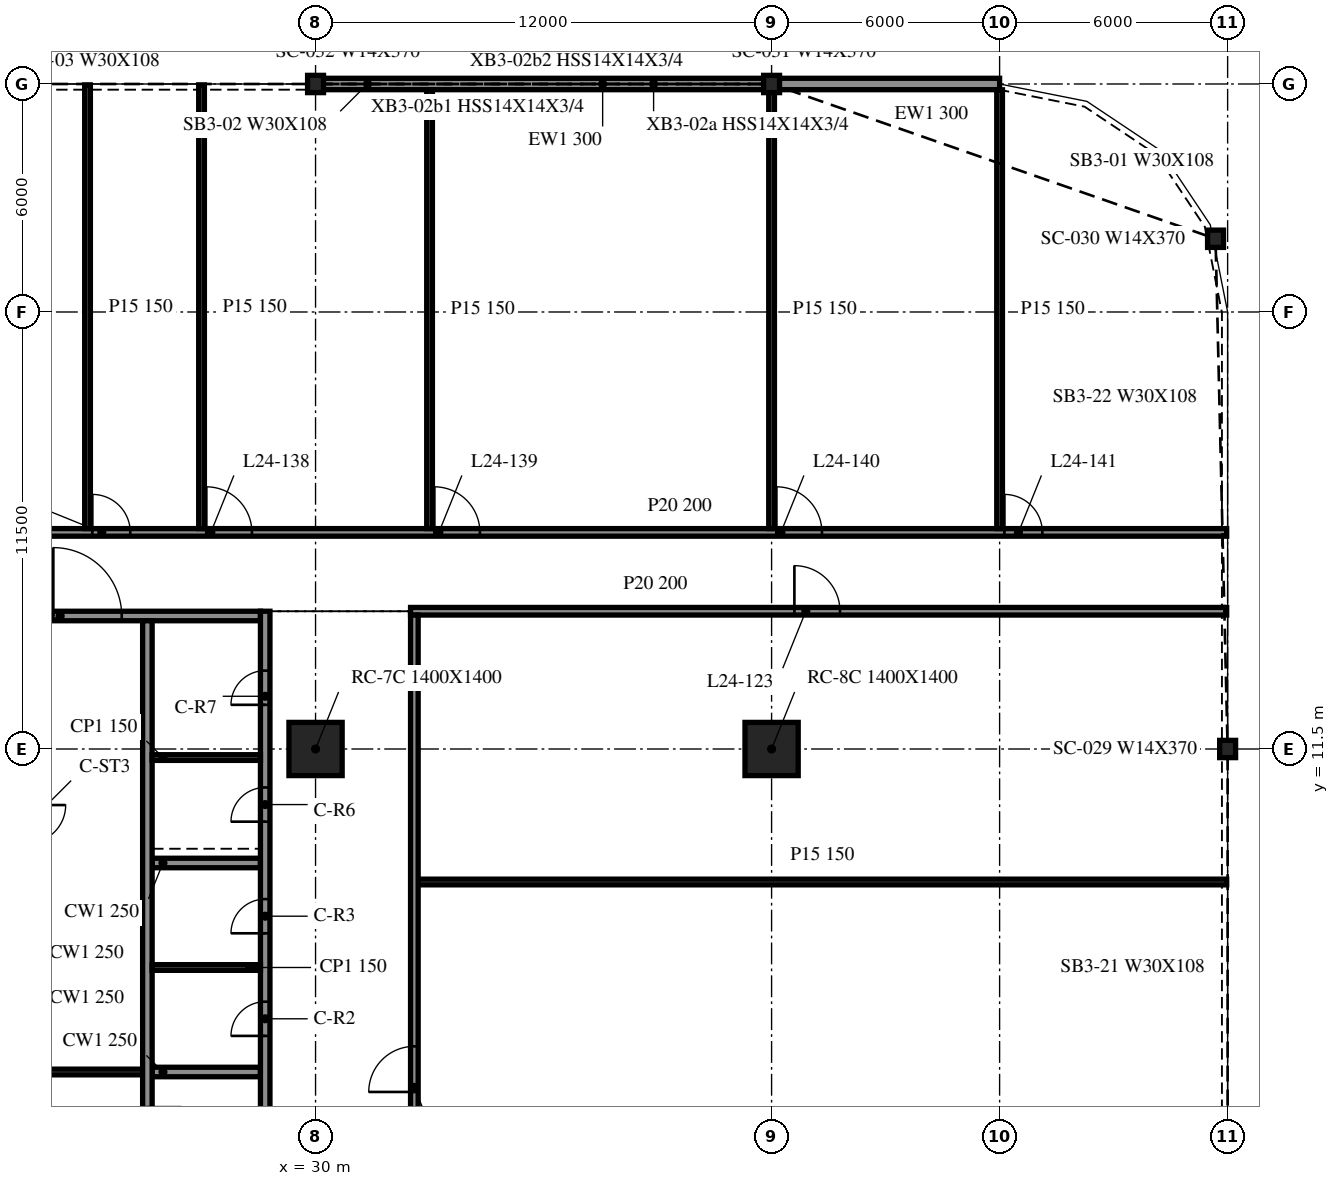
"""IFC4 building model, lengths in metres.
Left out: names, types, materials, properties, quantities, classifications, styles, units other than length and angle.
Written with IfcOpenShell. Run it as: python <this file> out.ifc"""

import sys

from ifc_helpers import new_model, si_unit, direction, frame, frame_2d, origin, origin_2d, place, context, subcontext, project, spatial, rectangle, i_section, extrude, element, fill, save


model = new_model("IFC4")
c1 = context("Model", 3, precision=1e-05, world=origin(), true_north=direction((0.0, 1.0)))
c2 = subcontext(c1, "Body", "Model", "MODEL_VIEW")
j1 = project(units=[si_unit("LENGTHUNIT", "METRE"), si_unit("PLANEANGLEUNIT", "RADIAN")], contexts=[c1])
p1 = place(None, origin())
s1 = spatial("IfcSite", under=j1, at=p1, CompositionType="ELEMENT")
p2 = place(p1, origin())
s2 = spatial("IfcBuilding", under=s1, at=p2, CompositionType="ELEMENT")
p3 = place(p2, frame((0.0, 0.0, 105.3)))
s3 = spatial("IfcBuildingStorey", under=s2, at=p3, CompositionType="ELEMENT", Elevation=105.3)
for number, where, z_axis, x_axis in (
    (1, (30.0, 11.5, -0.34), (0.0, 0.0, 1.0), (1.0, 0.0, 0.0)),
    (2, (42.0, 11.5, -0.34), (0.0, 0.0, 1.0), (1.0, 0.0, 0.0)),
):
    element("IfcColumn", number, at=place(p3, frame(where, z_axis=z_axis, x_axis=x_axis)), inside=s3, PredefinedType="COLUMN", context=c2, shape_type="SweptSolid", body=[
        extrude(rectangle(XDim=1.4, YDim=1.4, at=origin_2d()), origin(), (0.0, 0.0, 1.0), 4.1),
    ])
for number, where, z_axis, x_axis in (
    (3, (53.682, 24.927, -0.34), (0.0, 0.0, 1.0), (1.0, 0.0, 0.0)),
    (4, (42.0, 29.0, -0.34), (0.0, 0.0, 1.0), (1.0, 0.0, 0.0)),
    (5, (30.0, 29.0, -0.34), (0.0, 0.0, 1.0), (1.0, 0.0, 0.0)),
    (6, (54.0, 11.5, -0.34), (0.0, 0.0, 1.0), (1.0, 0.0, 0.0)),
):
    element("IfcColumn", number, at=place(p3, frame(where, z_axis=z_axis, x_axis=x_axis)), inside=s3, PredefinedType="COLUMN", context=c2, shape_type="SweptSolid", body=[
        extrude(i_section(OverallWidth=0.419, OverallDepth=0.455, WebThickness=0.042, FlangeThickness=0.068, at=origin_2d()), origin(), (0.0, 0.0, 1.0), 4.1),
    ])
p4 = place(p3, frame((48.0, 29.0, 0.0), z_axis=(0.0, 0.0, 1.0), x_axis=(-1.0, 0.0, 0.0)))
e7 = element("IfcWall", 7, at=p4, inside=s3, PredefinedType="NOTDEFINED", context=c2, shape_type="SweptSolid", body=[
    extrude(rectangle(XDim=5.979, YDim=0.3, at=frame_2d((2.99, 0.0))), origin(), (0.0, 0.0, 1.0), 3.003),
])
p5 = place(p3, frame((41.979, 29.0, 0.0), z_axis=(0.0, 0.0, 1.0), x_axis=(-1.0, 0.0, 0.0)))
e8 = element("IfcWall", 8, at=p5, inside=s3, PredefinedType="NOTDEFINED", context=c2, shape_type="SweptSolid", body=[
    extrude(rectangle(XDim=11.958, YDim=0.3, at=frame_2d((5.979, 0.0))), origin(), (0.0, 0.0, 1.0), 3.003),
])
p6 = place(p3, frame((28.675, -9.125, 0.0), z_axis=(0.0, 0.0, 1.0), x_axis=(0.0, 1.0, 0.0)))
e9 = element("IfcWall", 9, at=p6, inside=s3, PredefinedType="SOLIDWALL", context=c2, shape_type="SweptSolid", body=[
    extrude(rectangle(XDim=24.25, YDim=0.25, at=frame_2d((12.125, 0.0))), origin(), (0.0, 0.0, 1.0), 3.76),
])
p7 = place(p6, frame((13.075, 0.0, 0.0)))
e10 = element("IfcOpeningElement", 10, at=p7, cuts=e9, PredefinedType="OPENING", context=c2, shape_type="SweptSolid", body=[
    extrude(rectangle(XDim=0.9, YDim=2.1, at=frame_2d((0.45, 1.05))), frame((0.0, 0.135, 0.0), z_axis=(0.0, -1.0, 0.0), x_axis=(1.0, 0.0, 0.0)), (0.0, 0.0, 1.0), 0.27),
])
p8 = place(p6, frame((15.775, 0.0, 0.0)))
e11 = element("IfcOpeningElement", 11, at=p8, cuts=e9, PredefinedType="OPENING", context=c2, shape_type="SweptSolid", body=[
    extrude(rectangle(XDim=0.9, YDim=2.1, at=frame_2d((0.45, 1.05))), frame((0.0, 0.135, 0.0), z_axis=(0.0, -1.0, 0.0), x_axis=(1.0, 0.0, 0.0)), (0.0, 0.0, 1.0), 0.27),
])
p9 = place(p6, frame((18.712, 0.0, 0.0)))
e12 = element("IfcOpeningElement", 12, at=p9, cuts=e9, PredefinedType="OPENING", context=c2, shape_type="SweptSolid", body=[
    extrude(rectangle(XDim=0.9, YDim=2.1, at=frame_2d((0.45, 1.05))), frame((0.0, 0.135, 0.0), z_axis=(0.0, -1.0, 0.0), x_axis=(1.0, 0.0, 0.0)), (0.0, 0.0, 1.0), 0.27),
])
p10 = place(p6, frame((21.788, 0.0, 0.0)))
e13 = element("IfcOpeningElement", 13, at=p10, cuts=e9, PredefinedType="OPENING", context=c2, shape_type="SweptSolid", body=[
    extrude(rectangle(XDim=0.9, YDim=2.1, at=frame_2d((0.45, 1.05))), frame((0.0, 0.135, 0.0), z_axis=(0.0, -1.0, 0.0), x_axis=(1.0, 0.0, 0.0)), (0.0, 0.0, 1.0), 0.27),
])
p11 = place(p3, frame((19.45, 15.0, 0.0), z_axis=(0.0, 0.0, 1.0), x_axis=(1.0, 0.0, 0.0)))
e14 = element("IfcWall", 14, at=p11, inside=s3, PredefinedType="SOLIDWALL", context=c2, shape_type="SweptSolid", body=[
    extrude(rectangle(XDim=9.1, YDim=0.25, at=frame_2d((4.55, 0.0))), origin(), (0.0, 0.0, 1.0), 3.76),
])
p12 = place(p11, frame((3.65, 0.0, 0.0)))
e15 = element("IfcOpeningElement", 15, at=p12, cuts=e14, PredefinedType="OPENING", context=c2, shape_type="SweptSolid", body=[
    extrude(rectangle(XDim=1.8, YDim=2.1, at=frame_2d((0.9, 1.05))), frame((0.0, 0.135, 0.0), z_axis=(0.0, -1.0, 0.0), x_axis=(1.0, 0.0, 0.0)), (0.0, 0.0, 1.0), 0.27),
])
p13 = place(p3, frame((25.575, 14.875, 0.0), z_axis=(0.0, 0.0, 1.0), x_axis=(0.0, -1.0, 0.0)))
e16 = element("IfcWall", 16, at=p13, inside=s3, PredefinedType="SOLIDWALL", context=c2, shape_type="SweptSolid", body=[
    extrude(rectangle(XDim=17.5, YDim=0.25, at=frame_2d((8.75, 0.0))), origin(), (0.0, 0.0, 1.0), 3.76),
])
p14 = place(p13, frame((15.45, 0.0, 0.0)))
e17 = element("IfcOpeningElement", 17, at=p14, cuts=e16, PredefinedType="OPENING", context=c2, shape_type="SweptSolid", body=[
    extrude(rectangle(XDim=1.1, YDim=2.1, at=frame_2d((0.55, 1.05))), frame((0.0, 0.135, 0.0), z_axis=(0.0, -1.0, 0.0), x_axis=(1.0, 0.0, 0.0)), (0.0, 0.0, 1.0), 0.27),
])
p15 = place(p13, frame((12.8, 0.0, 0.0)))
e18 = element("IfcOpeningElement", 18, at=p15, cuts=e16, PredefinedType="OPENING", context=c2, shape_type="SweptSolid", body=[
    extrude(rectangle(XDim=0.9, YDim=2.1, at=frame_2d((0.45, 1.05))), frame((0.0, 0.135, 0.0), z_axis=(0.0, -1.0, 0.0), x_axis=(1.0, 0.0, 0.0)), (0.0, 0.0, 1.0), 0.27),
])
for number, where, z_axis, x_axis in (
    (19, (25.7, 3.0, 0.0), (0.0, 0.0, 1.0), (1.0, 0.0, 0.0)),
    (20, (25.7, 8.5, 0.0), (0.0, 0.0, 1.0), (1.0, 0.0, 0.0)),
):
    element("IfcWall", number, at=place(p3, frame(where, z_axis=z_axis, x_axis=x_axis)), inside=s3, PredefinedType="SOLIDWALL", context=c2, shape_type="SweptSolid", body=[
        extrude(rectangle(XDim=2.85, YDim=0.25, at=frame_2d((1.425, 0.0))), origin(), (0.0, 0.0, 1.0), 3.76),
    ])
p16 = place(p3, frame((22.55, 3.0, 0.0), z_axis=(0.0, 0.0, 1.0), x_axis=(1.0, 0.0, 0.0)))
e21 = element("IfcWall", 21, at=p16, inside=s3, PredefinedType="PARTITIONING", context=c2, shape_type="SweptSolid", body=[
    extrude(rectangle(XDim=2.9, YDim=0.15, at=frame_2d((1.45, 0.0))), origin(), (0.0, 0.0, 1.0), 3.76),
])
for number, where, z_axis, x_axis in (
    (22, (25.7, 5.75, 0.0), (0.0, 0.0, 1.0), (1.0, 0.0, 0.0)),
    (23, (25.7, 11.275, 0.0), (0.0, 0.0, 1.0), (1.0, 0.0, 0.0)),
):
    element("IfcWall", number, at=place(p3, frame(where, z_axis=z_axis, x_axis=x_axis)), inside=s3, PredefinedType="PARTITIONING", context=c2, shape_type="SweptSolid", body=[
        extrude(rectangle(XDim=2.85, YDim=0.15, at=frame_2d((1.425, 0.0))), origin(), (0.0, 0.0, 1.0), 3.76),
    ])
p17 = place(p3, frame((32.7, 8.0, 0.0), z_axis=(0.0, 0.0, 1.0), x_axis=(1.0, 0.0, 0.0)))
e24 = element("IfcWall", 24, at=p17, inside=s3, PredefinedType="PARTITIONING", context=c2, shape_type="SweptSolid", body=[
    extrude(rectangle(XDim=21.275, YDim=0.15, at=frame_2d((10.638, 0.0))), origin(), (0.0, 0.0, 1.0), 3.76),
])
p18 = place(p3, frame((32.5, 15.125, 0.0), z_axis=(0.0, 0.0, 1.0), x_axis=(1.0, 0.0, 0.0)))
e25 = element("IfcWall", 25, at=p18, inside=s3, PredefinedType="PARTITIONING", context=c2, shape_type="SweptSolid", body=[
    extrude(rectangle(XDim=21.475, YDim=0.2, at=frame_2d((10.738, 0.0))), origin(), (0.0, 0.0, 1.0), 3.76),
])
p19 = place(p18, frame((10.1, 0.0, 0.0)))
e26 = element("IfcOpeningElement", 26, at=p19, cuts=e25, PredefinedType="OPENING", context=c2, shape_type="SweptSolid", body=[
    extrude(rectangle(XDim=1.2, YDim=2.1, at=frame_2d((0.6, 1.05))), frame((0.0, 0.11, 0.0), z_axis=(0.0, -1.0, 0.0), x_axis=(1.0, 0.0, 0.0)), (0.0, 0.0, 1.0), 0.22),
])
p20 = place(p3, frame((-41.975, 17.2, 0.0), z_axis=(0.0, 0.0, 1.0), x_axis=(1.0, 0.0, 0.0)))
e27 = element("IfcWall", 27, at=p20, inside=s3, PredefinedType="PARTITIONING", context=c2, shape_type="SweptSolid", body=[
    extrude(rectangle(XDim=95.95, YDim=0.2, at=frame_2d((47.975, 0.0))), origin(), (0.0, 0.0, 1.0), 3.76),
])
p21 = place(p20, frame((4.3, 0.0, 0.0)))
e28 = element("IfcOpeningElement", 28, at=p21, cuts=e27, PredefinedType="OPENING", context=c2, shape_type="SweptSolid", body=[
    extrude(rectangle(XDim=1.2, YDim=2.1, at=frame_2d((0.6, 1.05))), frame((0.0, 0.11, 0.0), z_axis=(0.0, -1.0, 0.0), x_axis=(1.0, 0.0, 0.0)), (0.0, 0.0, 1.0), 0.22),
])
p22 = place(p20, frame((7.3, 0.0, 0.0)))
e29 = element("IfcOpeningElement", 29, at=p22, cuts=e27, PredefinedType="OPENING", context=c2, shape_type="SweptSolid", body=[
    extrude(rectangle(XDim=1.2, YDim=2.1, at=frame_2d((0.6, 1.05))), frame((0.0, 0.11, 0.0), z_axis=(0.0, -1.0, 0.0), x_axis=(1.0, 0.0, 0.0)), (0.0, 0.0, 1.0), 0.22),
])
p23 = place(p20, frame((13.3, 0.0, 0.0)))
e30 = element("IfcOpeningElement", 30, at=p23, cuts=e27, PredefinedType="OPENING", context=c2, shape_type="SweptSolid", body=[
    extrude(rectangle(XDim=1.2, YDim=2.1, at=frame_2d((0.6, 1.05))), frame((0.0, 0.11, 0.0), z_axis=(0.0, -1.0, 0.0), x_axis=(1.0, 0.0, 0.0)), (0.0, 0.0, 1.0), 0.22),
])
p24 = place(p20, frame((22.5, 0.0, 0.0)))
e31 = element("IfcOpeningElement", 31, at=p24, cuts=e27, PredefinedType="OPENING", context=c2, shape_type="SweptSolid", body=[
    extrude(rectangle(XDim=1.0, YDim=2.1, at=frame_2d((0.5, 1.05))), frame((0.0, 0.11, 0.0), z_axis=(0.0, -1.0, 0.0), x_axis=(1.0, 0.0, 0.0)), (0.0, 0.0, 1.0), 0.22),
])
p25 = place(p20, frame((28.5, 0.0, 0.0)))
e32 = element("IfcOpeningElement", 32, at=p25, cuts=e27, PredefinedType="OPENING", context=c2, shape_type="SweptSolid", body=[
    extrude(rectangle(XDim=1.0, YDim=2.1, at=frame_2d((0.5, 1.05))), frame((0.0, 0.11, 0.0), z_axis=(0.0, -1.0, 0.0), x_axis=(1.0, 0.0, 0.0)), (0.0, 0.0, 1.0), 0.22),
])
p26 = place(p20, frame((34.5, 0.0, 0.0)))
e33 = element("IfcOpeningElement", 33, at=p26, cuts=e27, PredefinedType="OPENING", context=c2, shape_type="SweptSolid", body=[
    extrude(rectangle(XDim=1.0, YDim=2.1, at=frame_2d((0.5, 1.05))), frame((0.0, 0.11, 0.0), z_axis=(0.0, -1.0, 0.0), x_axis=(1.0, 0.0, 0.0)), (0.0, 0.0, 1.0), 0.22),
])
p27 = place(p20, frame((37.3, 0.0, 0.0)))
e34 = element("IfcOpeningElement", 34, at=p27, cuts=e27, PredefinedType="OPENING", context=c2, shape_type="SweptSolid", body=[
    extrude(rectangle(XDim=1.2, YDim=2.1, at=frame_2d((0.6, 1.05))), frame((0.0, 0.11, 0.0), z_axis=(0.0, -1.0, 0.0), x_axis=(1.0, 0.0, 0.0)), (0.0, 0.0, 1.0), 0.22),
])
p28 = place(p20, frame((43.3, 0.0, 0.0)))
e35 = element("IfcOpeningElement", 35, at=p28, cuts=e27, PredefinedType="OPENING", context=c2, shape_type="SweptSolid", body=[
    extrude(rectangle(XDim=1.2, YDim=2.1, at=frame_2d((0.6, 1.05))), frame((0.0, 0.11, 0.0), z_axis=(0.0, -1.0, 0.0), x_axis=(1.0, 0.0, 0.0)), (0.0, 0.0, 1.0), 0.22),
])
p29 = place(p20, frame((47.3, 0.0, 0.0)))
e36 = element("IfcOpeningElement", 36, at=p29, cuts=e27, PredefinedType="OPENING", context=c2, shape_type="SweptSolid", body=[
    extrude(rectangle(XDim=1.2, YDim=2.1, at=frame_2d((0.6, 1.05))), frame((0.0, 0.11, 0.0), z_axis=(0.0, -1.0, 0.0), x_axis=(1.0, 0.0, 0.0)), (0.0, 0.0, 1.0), 0.22),
])
p30 = place(p20, frame((54.1, 0.0, 0.0)))
e37 = element("IfcOpeningElement", 37, at=p30, cuts=e27, PredefinedType="OPENING", context=c2, shape_type="SweptSolid", body=[
    extrude(rectangle(XDim=1.0, YDim=2.1, at=frame_2d((0.5, 1.05))), frame((0.0, 0.11, 0.0), z_axis=(0.0, -1.0, 0.0), x_axis=(1.0, 0.0, 0.0)), (0.0, 0.0, 1.0), 0.22),
])
p31 = place(p20, frame((60.1, 0.0, 0.0)))
e38 = element("IfcOpeningElement", 38, at=p31, cuts=e27, PredefinedType="OPENING", context=c2, shape_type="SweptSolid", body=[
    extrude(rectangle(XDim=1.0, YDim=2.1, at=frame_2d((0.5, 1.05))), frame((0.0, 0.11, 0.0), z_axis=(0.0, -1.0, 0.0), x_axis=(1.0, 0.0, 0.0)), (0.0, 0.0, 1.0), 0.22),
])
p32 = place(p20, frame((66.1, 0.0, 0.0)))
e39 = element("IfcOpeningElement", 39, at=p32, cuts=e27, PredefinedType="OPENING", context=c2, shape_type="SweptSolid", body=[
    extrude(rectangle(XDim=1.0, YDim=2.1, at=frame_2d((0.5, 1.05))), frame((0.0, 0.11, 0.0), z_axis=(0.0, -1.0, 0.0), x_axis=(1.0, 0.0, 0.0)), (0.0, 0.0, 1.0), 0.22),
])
p33 = place(p20, frame((69.1, 0.0, 0.0)))
e40 = element("IfcOpeningElement", 40, at=p33, cuts=e27, PredefinedType="OPENING", context=c2, shape_type="SweptSolid", body=[
    extrude(rectangle(XDim=1.2, YDim=2.1, at=frame_2d((0.6, 1.05))), frame((0.0, 0.11, 0.0), z_axis=(0.0, -1.0, 0.0), x_axis=(1.0, 0.0, 0.0)), (0.0, 0.0, 1.0), 0.22),
])
p34 = place(p20, frame((75.1, 0.0, 0.0)))
e41 = element("IfcOpeningElement", 41, at=p34, cuts=e27, PredefinedType="OPENING", context=c2, shape_type="SweptSolid", body=[
    extrude(rectangle(XDim=1.2, YDim=2.1, at=frame_2d((0.6, 1.05))), frame((0.0, 0.11, 0.0), z_axis=(0.0, -1.0, 0.0), x_axis=(1.0, 0.0, 0.0)), (0.0, 0.0, 1.0), 0.22),
])
p35 = place(p20, frame((84.1, 0.0, 0.0)))
e42 = element("IfcOpeningElement", 42, at=p35, cuts=e27, PredefinedType="OPENING", context=c2, shape_type="SweptSolid", body=[
    extrude(rectangle(XDim=1.2, YDim=2.1, at=frame_2d((0.6, 1.05))), frame((0.0, 0.11, 0.0), z_axis=(0.0, -1.0, 0.0), x_axis=(1.0, 0.0, 0.0)), (0.0, 0.0, 1.0), 0.22),
])
p36 = place(p20, frame((90.1, 0.0, 0.0)))
e43 = element("IfcOpeningElement", 43, at=p36, cuts=e27, PredefinedType="OPENING", context=c2, shape_type="SweptSolid", body=[
    extrude(rectangle(XDim=1.0, YDim=2.1, at=frame_2d((0.5, 1.05))), frame((0.0, 0.11, 0.0), z_axis=(0.0, -1.0, 0.0), x_axis=(1.0, 0.0, 0.0)), (0.0, 0.0, 1.0), 0.22),
])
for number, where, z_axis, x_axis in (
    (44, (24.0, 17.3, 0.0), (0.0, 0.0, 1.0), (0.0, 1.0, 0.0)),
    (45, (27.0, 17.3, 0.0), (0.0, 0.0, 1.0), (0.0, 1.0, 0.0)),
):
    element("IfcWall", number, at=place(p3, frame(where, z_axis=z_axis, x_axis=x_axis)), inside=s3, PredefinedType="PARTITIONING", context=c2, shape_type="SweptSolid", body=[
        extrude(rectangle(XDim=11.675, YDim=0.15, at=frame_2d((5.837, 0.0))), origin(), (0.0, 0.0, 1.0), 3.76),
    ])
p37 = place(p3, frame((32.6, -9.025, 0.0), z_axis=(0.0, 0.0, 1.0), x_axis=(0.0, 1.0, 0.0)))
e46 = element("IfcWall", 46, at=p37, inside=s3, PredefinedType="PARTITIONING", context=c2, shape_type="SweptSolid", body=[
    extrude(rectangle(XDim=24.05, YDim=0.2, at=frame_2d((12.025, 0.0))), origin(), (0.0, 0.0, 1.0), 3.76),
])
p38 = place(p37, frame((11.5, 0.0, 0.0)))
e47 = element("IfcOpeningElement", 47, at=p38, cuts=e46, PredefinedType="OPENING", context=c2, shape_type="SweptSolid", body=[
    extrude(rectangle(XDim=1.2, YDim=2.1, at=frame_2d((0.6, 1.05))), frame((0.0, 0.11, 0.0), z_axis=(0.0, -1.0, 0.0), x_axis=(1.0, 0.0, 0.0)), (0.0, 0.0, 1.0), 0.22),
])
for number, where, z_axis, x_axis in (
    (48, (33.0, 17.3, 0.0), (0.0, 0.0, 1.0), (0.0, 1.0, 0.0)),
    (49, (42.0, 17.3, 0.0), (0.0, 0.0, 1.0), (0.0, 1.0, 0.0)),
):
    element("IfcWall", number, at=place(p3, frame(where, z_axis=z_axis, x_axis=x_axis)), inside=s3, PredefinedType="PARTITIONING", context=c2, shape_type="SweptSolid", body=[
        extrude(rectangle(XDim=11.55, YDim=0.15, at=frame_2d((5.775, 0.0))), origin(), (0.0, 0.0, 1.0), 3.76),
    ])
p39 = place(p3, frame((48.0, 17.3, 0.0), z_axis=(0.0, 0.0, 1.0), x_axis=(0.0, 1.0, 0.0)))
e50 = element("IfcWall", 50, at=p39, inside=s3, PredefinedType="PARTITIONING", context=c2, shape_type="SweptSolid", body=[
    extrude(rectangle(XDim=11.547, YDim=0.15, at=frame_2d((5.773, 0.0))), origin(), (0.0, 0.0, 1.0), 3.76),
])
p40 = place(p12, origin())
e51 = element("IfcDoor", 51, at=p40, inside=s3, OperationType="DOUBLE_DOOR_SINGLE_SWING", PredefinedType="DOOR", context=c2, shape_type="SweptSolid", body=[
    extrude(rectangle(XDim=1.8, YDim=2.1, at=frame_2d((0.9, 1.05))), frame((0.0, 0.025, 0.0), z_axis=(0.0, -1.0, 0.0), x_axis=(1.0, 0.0, 0.0)), (0.0, 0.0, 1.0), 0.05),
])
fill(e15, e51)
p41 = place(p7, origin())
e52 = element("IfcDoor", 52, at=p41, inside=s3, OperationType="SINGLE_SWING_RIGHT", PredefinedType="DOOR", context=c2, shape_type="SweptSolid", body=[
    extrude(rectangle(XDim=0.9, YDim=2.1, at=frame_2d((0.45, 1.05))), frame((0.0, 0.025, 0.0), z_axis=(0.0, -1.0, 0.0), x_axis=(1.0, 0.0, 0.0)), (0.0, 0.0, 1.0), 0.05),
])
fill(e10, e52)
p42 = place(p8, origin())
e53 = element("IfcDoor", 53, at=p42, inside=s3, OperationType="SINGLE_SWING_LEFT", PredefinedType="DOOR", context=c2, shape_type="SweptSolid", body=[
    extrude(rectangle(XDim=0.9, YDim=2.1, at=frame_2d((0.45, 1.05))), frame((0.0, 0.025, 0.0), z_axis=(0.0, -1.0, 0.0), x_axis=(1.0, 0.0, 0.0)), (0.0, 0.0, 1.0), 0.05),
])
fill(e11, e53)
p43 = place(p9, origin())
e54 = element("IfcDoor", 54, at=p43, inside=s3, OperationType="SINGLE_SWING_RIGHT", PredefinedType="DOOR", context=c2, shape_type="SweptSolid", body=[
    extrude(rectangle(XDim=0.9, YDim=2.1, at=frame_2d((0.45, 1.05))), frame((0.0, 0.025, 0.0), z_axis=(0.0, -1.0, 0.0), x_axis=(1.0, 0.0, 0.0)), (0.0, 0.0, 1.0), 0.05),
])
fill(e12, e54)
p44 = place(p10, origin())
e55 = element("IfcDoor", 55, at=p44, inside=s3, OperationType="SINGLE_SWING_LEFT", PredefinedType="DOOR", context=c2, shape_type="SweptSolid", body=[
    extrude(rectangle(XDim=0.9, YDim=2.1, at=frame_2d((0.45, 1.05))), frame((0.0, 0.025, 0.0), z_axis=(0.0, -1.0, 0.0), x_axis=(1.0, 0.0, 0.0)), (0.0, 0.0, 1.0), 0.05),
])
fill(e13, e55)
p45 = place(p38, origin())
e56 = element("IfcDoor", 56, at=p45, inside=s3, OperationType="SINGLE_SWING_LEFT", PredefinedType="DOOR", context=c2, shape_type="SweptSolid", body=[
    extrude(rectangle(XDim=1.2, YDim=2.1, at=frame_2d((0.6, 1.05))), frame((0.0, 0.025, 0.0), z_axis=(0.0, -1.0, 0.0), x_axis=(1.0, 0.0, 0.0)), (0.0, 0.0, 1.0), 0.05),
])
fill(e47, e56)
p46 = place(p19, origin())
e57 = element("IfcDoor", 57, at=p46, inside=s3, OperationType="SINGLE_SWING_LEFT", PredefinedType="DOOR", context=c2, shape_type="SweptSolid", body=[
    extrude(rectangle(XDim=1.2, YDim=2.1, at=frame_2d((0.6, 1.05))), frame((0.0, 0.025, 0.0), z_axis=(0.0, -1.0, 0.0), x_axis=(1.0, 0.0, 0.0)), (0.0, 0.0, 1.0), 0.05),
])
fill(e26, e57)
p47 = place(p32, origin())
e58 = element("IfcDoor", 58, at=p47, inside=s3, OperationType="SINGLE_SWING_RIGHT", PredefinedType="DOOR", context=c2, shape_type="SweptSolid", body=[
    extrude(rectangle(XDim=1.0, YDim=2.1, at=frame_2d((0.5, 1.05))), frame((0.0, 0.025, 0.0), z_axis=(0.0, -1.0, 0.0), x_axis=(1.0, 0.0, 0.0)), (0.0, 0.0, 1.0), 0.05),
])
fill(e39, e58)
p48 = place(p33, origin())
e59 = element("IfcDoor", 59, at=p48, inside=s3, OperationType="SINGLE_SWING_RIGHT", PredefinedType="DOOR", context=c2, shape_type="SweptSolid", body=[
    extrude(rectangle(XDim=1.2, YDim=2.1, at=frame_2d((0.6, 1.05))), frame((0.0, 0.025, 0.0), z_axis=(0.0, -1.0, 0.0), x_axis=(1.0, 0.0, 0.0)), (0.0, 0.0, 1.0), 0.05),
])
fill(e40, e59)
p49 = place(p34, origin())
e60 = element("IfcDoor", 60, at=p49, inside=s3, OperationType="SINGLE_SWING_RIGHT", PredefinedType="DOOR", context=c2, shape_type="SweptSolid", body=[
    extrude(rectangle(XDim=1.2, YDim=2.1, at=frame_2d((0.6, 1.05))), frame((0.0, 0.025, 0.0), z_axis=(0.0, -1.0, 0.0), x_axis=(1.0, 0.0, 0.0)), (0.0, 0.0, 1.0), 0.05),
])
fill(e41, e60)
p50 = place(p35, origin())
e61 = element("IfcDoor", 61, at=p50, inside=s3, OperationType="SINGLE_SWING_RIGHT", PredefinedType="DOOR", context=c2, shape_type="SweptSolid", body=[
    extrude(rectangle(XDim=1.2, YDim=2.1, at=frame_2d((0.6, 1.05))), frame((0.0, 0.025, 0.0), z_axis=(0.0, -1.0, 0.0), x_axis=(1.0, 0.0, 0.0)), (0.0, 0.0, 1.0), 0.05),
])
fill(e42, e61)
p51 = place(p36, origin())
e62 = element("IfcDoor", 62, at=p51, inside=s3, OperationType="SINGLE_SWING_RIGHT", PredefinedType="DOOR", context=c2, shape_type="SweptSolid", body=[
    extrude(rectangle(XDim=1.0, YDim=2.1, at=frame_2d((0.5, 1.05))), frame((0.0, 0.025, 0.0), z_axis=(0.0, -1.0, 0.0), x_axis=(1.0, 0.0, 0.0)), (0.0, 0.0, 1.0), 0.05),
])
fill(e43, e62)
save(model, sys.argv[1])
